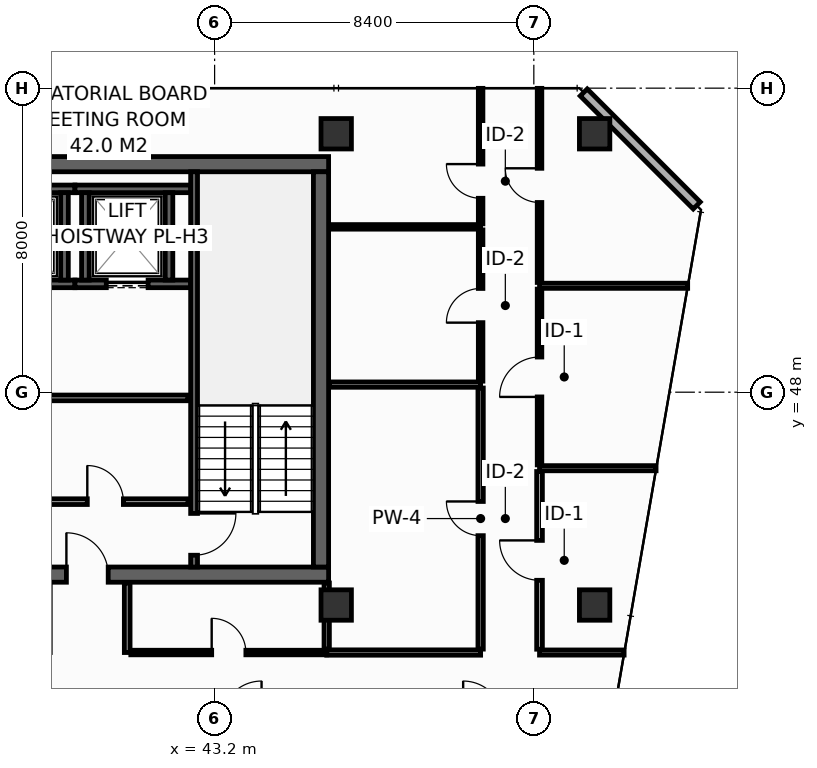
"""IFC4 building model, lengths in metres.
Left out: names, types, materials, properties, quantities, classifications, styles, units other than length and angle.
Written with IfcOpenShell. Run it as: python <this file> out.ifc"""

import sys

from ifc_helpers import new_model, si_unit, direction, frame, frame_2d, origin, origin_2d, place, context, subcontext, project, spatial, rectangle, hollow_rectangle, extrude, element, fill, save


model = new_model("IFC4")
c1 = context("Model", 3, precision=1e-05, world=origin(), true_north=direction((0.0, 1.0)))
c2 = subcontext(c1, "Body", "Model", "MODEL_VIEW")
j1 = project(units=[si_unit("LENGTHUNIT", "METRE"), si_unit("PLANEANGLEUNIT", "RADIAN")], contexts=[c1])
p1 = place(None, origin())
s1 = spatial("IfcSite", under=j1, at=p1, CompositionType="ELEMENT")
p2 = place(p1, origin())
s2 = spatial("IfcBuilding", under=s1, at=p2, CompositionType="ELEMENT")
p3 = place(p2, frame((0.0, 0.0, 249.6)))
s3 = spatial("IfcBuildingStorey", under=s2, at=p3, CompositionType="ELEMENT", Elevation=249.6)
p4 = place(p3, frame((13.7, 43.2, 0.0), z_axis=(0.0, 0.0, 1.0), x_axis=(1.0, 0.0, 0.0)))
e1 = element("IfcWall", 1, at=p4, inside=s3, PredefinedType="SHEAR", context=c2, shape_type="SweptSolid", body=[
    extrude(rectangle(XDim=32.5, YDim=0.4, at=frame_2d((16.25, 0.0))), origin(), (0.0, 0.0, 1.0), 3.35),
])
p5 = place(p4, frame((5.4, 0.0, 0.0)))
e2 = element("IfcOpeningElement", 2, at=p5, cuts=e1, PredefinedType="OPENING", context=c2, shape_type="SweptSolid", body=[
    extrude(rectangle(XDim=1.1, YDim=2.15, at=frame_2d((0.55, 1.075))), frame((0.0, 0.21, 0.0), z_axis=(0.0, -1.0, 0.0), x_axis=(1.0, 0.0, 0.0)), (0.0, 0.0, 1.0), 0.42),
])
p6 = place(p4, frame((25.6, 0.0, 0.0)))
e3 = element("IfcOpeningElement", 3, at=p6, cuts=e1, PredefinedType="OPENING", context=c2, shape_type="SweptSolid", body=[
    extrude(rectangle(XDim=1.1, YDim=2.15, at=frame_2d((0.55, 1.075))), frame((0.0, 0.21, 0.0), z_axis=(0.0, -1.0, 0.0), x_axis=(1.0, 0.0, 0.0)), (0.0, 0.0, 1.0), 0.42),
])
p7 = place(p3, frame((13.7, 54.0, 0.0), z_axis=(0.0, 0.0, 1.0), x_axis=(1.0, 0.0, 0.0)))
e4 = element("IfcWall", 4, at=p7, inside=s3, PredefinedType="SHEAR", context=c2, shape_type="SweptSolid", body=[
    extrude(rectangle(XDim=32.5, YDim=0.4, at=frame_2d((16.25, 0.0))), origin(), (0.0, 0.0, 1.0), 3.35),
])
p8 = place(p3, frame((46.0, 43.4, 0.0), z_axis=(0.0, 0.0, 1.0), x_axis=(0.0, 1.0, 0.0)))
e5 = element("IfcWall", 5, at=p8, inside=s3, PredefinedType="SHEAR", context=c2, shape_type="SweptSolid", body=[
    extrude(rectangle(XDim=10.4, YDim=0.4, at=frame_2d((5.2, 0.0))), origin(), (0.0, 0.0, 1.0), 3.35),
])
for number, where, z_axis, x_axis in (
    (6, (46.4, 54.8, 0.0), (0.0, 0.0, 1.0), (1.0, 0.0, 0.0)),
    (7, (53.2, 54.8, 0.0), (0.0, 0.0, 1.0), (1.0, 0.0, 0.0)),
    (8, (46.4, 42.4, 0.0), (0.0, 0.0, 1.0), (1.0, 0.0, 0.0)),
    (9, (53.2, 42.4, 0.0), (0.0, 0.0, 1.0), (1.0, 0.0, 0.0)),
):
    element("IfcColumn", number, at=place(p3, frame(where, z_axis=z_axis, x_axis=x_axis)), inside=s3, PredefinedType="COLUMN", context=c2, shape_type="SweptSolid", body=[
        extrude(hollow_rectangle(XDim=0.8, YDim=0.8, WallThickness=0.036, at=origin_2d()), origin(), (0.0, 0.0, 1.0), 3.8),
    ])
p9 = place(p3, frame((36.775, 50.85, 0.0), z_axis=(0.0, 0.0, 1.0), x_axis=(1.0, 0.0, 0.0)))
e10 = element("IfcWall", 10, at=p9, inside=s3, PredefinedType="SHEAR", context=c2, shape_type="SweptSolid", body=[
    extrude(rectangle(XDim=2.75, YDim=0.2, at=frame_2d((1.375, 0.0))), origin(), (0.0, 0.0, 1.0), 3.35),
])
p10 = place(p9, frame((0.825, 0.0, 0.0)))
e11 = element("IfcOpeningElement", 11, at=p10, cuts=e10, PredefinedType="OPENING", context=c2, shape_type="SweptSolid", body=[
    extrude(rectangle(XDim=1.1, YDim=2.2, at=frame_2d((0.55, 1.1))), frame((0.0, 0.11, 0.0), z_axis=(0.0, -1.0, 0.0), x_axis=(1.0, 0.0, 0.0)), (0.0, 0.0, 1.0), 0.22),
])
p11 = place(p3, frame((36.775, 53.35, 0.0), z_axis=(0.0, 0.0, 1.0), x_axis=(1.0, 0.0, 0.0)))
e12 = element("IfcWall", 12, at=p11, inside=s3, PredefinedType="SHEAR", context=c2, shape_type="SweptSolid", body=[
    extrude(rectangle(XDim=2.75, YDim=0.2, at=frame_2d((1.375, 0.0))), origin(), (0.0, 0.0, 1.0), 3.35),
])
p12 = place(p3, frame((39.25, 50.95, 0.0), z_axis=(0.0, 0.0, 1.0), x_axis=(0.0, 1.0, 0.0)))
e13 = element("IfcWall", 13, at=p12, inside=s3, PredefinedType="SHEAR", context=c2, shape_type="SweptSolid", body=[
    extrude(rectangle(XDim=2.3, YDim=0.2, at=frame_2d((1.15, 0.0))), origin(), (0.0, 0.0, 1.0), 3.35),
])
p13 = place(p3, frame((39.525, 50.85, 0.0), z_axis=(0.0, 0.0, 1.0), x_axis=(1.0, 0.0, 0.0)))
e14 = element("IfcWall", 14, at=p13, inside=s3, PredefinedType="SHEAR", context=c2, shape_type="SweptSolid", body=[
    extrude(rectangle(XDim=3.045, YDim=0.2, at=frame_2d((1.522, 0.0))), origin(), (0.0, 0.0, 1.0), 3.35),
])
p14 = place(p13, frame((0.825, 0.0, 0.0)))
e15 = element("IfcOpeningElement", 15, at=p14, cuts=e14, PredefinedType="OPENING", context=c2, shape_type="SweptSolid", body=[
    extrude(rectangle(XDim=1.1, YDim=2.2, at=frame_2d((0.55, 1.1))), frame((0.0, 0.11, 0.0), z_axis=(0.0, -1.0, 0.0), x_axis=(1.0, 0.0, 0.0)), (0.0, 0.0, 1.0), 0.22),
])
p15 = place(p3, frame((39.525, 53.35, 0.0), z_axis=(0.0, 0.0, 1.0), x_axis=(1.0, 0.0, 0.0)))
e16 = element("IfcWall", 16, at=p15, inside=s3, PredefinedType="SHEAR", context=c2, shape_type="SweptSolid", body=[
    extrude(rectangle(XDim=3.045, YDim=0.2, at=frame_2d((1.522, 0.0))), origin(), (0.0, 0.0, 1.0), 3.35),
])
for number, where, z_axis, x_axis in (
    (17, (39.8, 50.95, 0.0), (0.0, 0.0, 1.0), (0.0, 1.0, 0.0)),
    (18, (42.0, 50.95, 0.0), (0.0, 0.0, 1.0), (0.0, 1.0, 0.0)),
):
    element("IfcWall", number, at=place(p3, frame(where, z_axis=z_axis, x_axis=x_axis)), inside=s3, PredefinedType="SHEAR", context=c2, shape_type="SweptSolid", body=[
        extrude(rectangle(XDim=2.3, YDim=0.2, at=frame_2d((1.15, 0.0))), origin(), (0.0, 0.0, 1.0), 3.35),
    ])
p16 = place(p3, frame((42.66, 53.8, 0.0), z_axis=(0.0, 0.0, 1.0), x_axis=(0.0, -1.0, 0.0)))
e19 = element("IfcWall", 19, at=p16, inside=s3, PredefinedType="SHEAR", context=c2, shape_type="SweptSolid", body=[
    extrude(rectangle(XDim=10.4, YDim=0.18, at=frame_2d((5.2, 0.0))), origin(), (0.0, 0.0, 1.0), 3.35),
])
p17 = place(p16, frame((8.99, 0.0, 0.0)))
e20 = element("IfcOpeningElement", 20, at=p17, cuts=e19, PredefinedType="OPENING", context=c2, shape_type="SweptSolid", body=[
    extrude(rectangle(XDim=1.1, YDim=2.15, at=frame_2d((0.55, 1.075))), frame((0.0, 0.1, 0.0), z_axis=(0.0, -1.0, 0.0), x_axis=(1.0, 0.0, 0.0)), (0.0, 0.0, 1.0), 0.2),
])
p18 = place(p3, frame((34.05, 45.12, 0.0), z_axis=(0.0, 0.0, 1.0), x_axis=(1.0, 0.0, 0.0)))
e21 = element("IfcWall", 21, at=p18, inside=s3, PredefinedType="PARTITIONING", context=c2, shape_type="SweptSolid", body=[
    extrude(rectangle(XDim=8.45, YDim=0.15, at=frame_2d((4.225, 0.0))), origin(), (0.0, 0.0, 1.0), 3.35),
])
p19 = place(p18, frame((1.5, 0.0, 0.0)))
e22 = element("IfcOpeningElement", 22, at=p19, cuts=e21, PredefinedType="OPENING", context=c2, shape_type="SweptSolid", body=[
    extrude(rectangle(XDim=0.95, YDim=2.15, at=frame_2d((0.475, 1.075))), frame((0.0, 0.085, 0.0), z_axis=(0.0, -1.0, 0.0), x_axis=(1.0, 0.0, 0.0)), (0.0, 0.0, 1.0), 0.17),
])
p20 = place(p18, frame((5.8, 0.0, 0.0)))
e23 = element("IfcOpeningElement", 23, at=p20, cuts=e21, PredefinedType="OPENING", context=c2, shape_type="SweptSolid", body=[
    extrude(rectangle(XDim=0.95, YDim=2.15, at=frame_2d((0.475, 1.075))), frame((0.0, 0.085, 0.0), z_axis=(0.0, -1.0, 0.0), x_axis=(1.0, 0.0, 0.0)), (0.0, 0.0, 1.0), 0.17),
])
p21 = place(p3, frame((34.05, 47.85, 0.0), z_axis=(0.0, 0.0, 1.0), x_axis=(1.0, 0.0, 0.0)))
e24 = element("IfcWall", 24, at=p21, inside=s3, PredefinedType="PARTITIONING", context=c2, shape_type="SweptSolid", body=[
    extrude(rectangle(XDim=8.45, YDim=0.15, at=frame_2d((4.225, 0.0))), origin(), (0.0, 0.0, 1.0), 3.35),
])
p22 = place(p3, frame((55.887, 52.913, 0.0), z_axis=(0.0, 0.0, 1.0), x_axis=(-0.707106781187, 0.707106781187, 0.0)))
e25 = element("IfcWall", 25, at=p22, inside=s3, PredefinedType="STANDARD", context=c2, shape_type="SweptSolid", body=[
    extrude(rectangle(XDim=4.206, YDim=0.26, at=frame_2d((2.103, 0.0))), origin(), (0.0, 0.0, 1.0), 3.35),
])
p23 = place(p3, frame((46.15, 41.15, 0.0), z_axis=(0.0, 0.0, 1.0), x_axis=(1.0, 0.0, 0.0)))
e26 = element("IfcWall", 26, at=p23, inside=s3, PredefinedType="PARTITIONING", context=c2, shape_type="SweptSolid", body=[
    extrude(rectangle(XDim=4.05, YDim=0.14, at=frame_2d((2.025, 0.0))), origin(), (0.0, 0.0, 1.0), 3.35),
])
p24 = place(p3, frame((46.15, 41.24, 0.0), z_axis=(0.0, 0.0, 1.0), x_axis=(0.0, 1.0, 0.0)))
e27 = element("IfcWall", 27, at=p24, inside=s3, PredefinedType="PARTITIONING", context=c2, shape_type="SweptSolid", body=[
    extrude(rectangle(XDim=1.74, YDim=0.14, at=frame_2d((0.87, 0.0))), origin(), (0.0, 0.0, 1.0), 3.35),
])
p25 = place(p3, frame((46.22, 48.2, 0.0), z_axis=(0.0, 0.0, 1.0), x_axis=(1.0, 0.0, 0.0)))
e28 = element("IfcWall", 28, at=p25, inside=s3, PredefinedType="PARTITIONING", context=c2, shape_type="SweptSolid", body=[
    extrude(rectangle(XDim=3.98, YDim=0.14, at=frame_2d((1.99, 0.0))), origin(), (0.0, 0.0, 1.0), 3.35),
])
p26 = place(p3, frame((50.2, 41.24, 0.0), z_axis=(0.0, 0.0, 1.0), x_axis=(0.0, 1.0, 0.0)))
e29 = element("IfcWall", 29, at=p26, inside=s3, PredefinedType="PARTITIONING", context=c2, shape_type="SweptSolid", body=[
    extrude(rectangle(XDim=6.87, YDim=0.14, at=frame_2d((3.435, 0.0))), origin(), (0.0, 0.0, 1.0), 2.747),
])
p27 = place(p26, frame((2.985, 0.0, 0.0)))
e30 = element("IfcOpeningElement", 30, at=p27, cuts=e29, PredefinedType="OPENING", context=c2, shape_type="SweptSolid", body=[
    extrude(rectangle(XDim=0.9, YDim=2.1, at=frame_2d((0.45, 1.05))), frame((0.0, 0.08, 0.0), z_axis=(0.0, -1.0, 0.0), x_axis=(1.0, 0.0, 0.0)), (0.0, 0.0, 1.0), 0.16),
])
p28 = place(p3, frame((46.22, 52.35, 0.0), z_axis=(0.0, 0.0, 1.0), x_axis=(1.0, 0.0, 0.0)))
e31 = element("IfcWall", 31, at=p28, inside=s3, PredefinedType="PARTITIONING", context=c2, shape_type="SweptSolid", body=[
    extrude(rectangle(XDim=3.98, YDim=0.12, at=frame_2d((1.99, 0.0))), origin(), (0.0, 0.0, 1.0), 3.35),
])
p29 = place(p3, frame((50.2, 48.29, 0.0), z_axis=(0.0, 0.0, 1.0), x_axis=(0.0, 1.0, 0.0)))
e32 = element("IfcWall", 32, at=p29, inside=s3, PredefinedType="PARTITIONING", context=c2, shape_type="SweptSolid", body=[
    extrude(rectangle(XDim=3.98, YDim=0.12, at=frame_2d((1.99, 0.0))), origin(), (0.0, 0.0, 1.0), 3.35),
])
p30 = place(p29, frame((1.54, 0.0, 0.0)))
e33 = element("IfcOpeningElement", 33, at=p30, cuts=e32, PredefinedType="OPENING", context=c2, shape_type="SweptSolid", body=[
    extrude(rectangle(XDim=0.9, YDim=2.1, at=frame_2d((0.45, 1.05))), frame((0.0, 0.07, 0.0), z_axis=(0.0, -1.0, 0.0), x_axis=(1.0, 0.0, 0.0)), (0.0, 0.0, 1.0), 0.14),
])
p31 = place(p3, frame((50.2, 52.43, 0.0), z_axis=(0.0, 0.0, 1.0), x_axis=(0.0, 1.0, 0.0)))
e34 = element("IfcWall", 34, at=p31, inside=s3, PredefinedType="PARTITIONING", context=c2, shape_type="SweptSolid", body=[
    extrude(rectangle(XDim=3.565, YDim=0.12, at=frame_2d((1.783, 0.0))), origin(), (0.0, 0.0, 1.0), 2.735),
])
p32 = place(p31, frame((0.672, 0.0, 0.0)))
e35 = element("IfcOpeningElement", 35, at=p32, cuts=e34, PredefinedType="OPENING", context=c2, shape_type="SweptSolid", body=[
    extrude(rectangle(XDim=0.9, YDim=2.1, at=frame_2d((0.45, 1.05))), frame((0.0, 0.07, 0.0), z_axis=(0.0, -1.0, 0.0), x_axis=(1.0, 0.0, 0.0)), (0.0, 0.0, 1.0), 0.14),
])
p33 = place(p3, frame((51.75, 41.15, 0.0), z_axis=(0.0, 0.0, 1.0), x_axis=(1.0, 0.0, 0.0)))
e36 = element("IfcWall", 36, at=p33, inside=s3, PredefinedType="PARTITIONING", context=c2, shape_type="SweptSolid", body=[
    extrude(rectangle(XDim=2.226, YDim=0.135, at=frame_2d((1.113, 0.0))), origin(), (0.0, 0.0, 1.0), 2.885),
])
p34 = place(p3, frame((51.75, 46.0, 0.0), z_axis=(0.0, 0.0, 1.0), x_axis=(1.0, 0.0, 0.0)))
e37 = element("IfcWall", 37, at=p34, inside=s3, PredefinedType="PARTITIONING", context=c2, shape_type="SweptSolid", body=[
    extrude(rectangle(XDim=3.066, YDim=0.135, at=frame_2d((1.533, 0.0))), origin(), (0.0, 0.0, 1.0), 2.747),
])
p35 = place(p3, frame((51.75, 50.8, 0.0), z_axis=(0.0, 0.0, 1.0), x_axis=(1.0, 0.0, 0.0)))
e38 = element("IfcWall", 38, at=p35, inside=s3, PredefinedType="PARTITIONING", context=c2, shape_type="SweptSolid", body=[
    extrude(rectangle(XDim=3.898, YDim=0.135, at=frame_2d((1.949, 0.0))), origin(), (0.0, 0.0, 1.0), 2.747),
])
p36 = place(p3, frame((51.75, 41.238, 0.0), z_axis=(0.0, 0.0, 1.0), x_axis=(0.0, 1.0, 0.0)))
e39 = element("IfcWall", 39, at=p36, inside=s3, PredefinedType="PARTITIONING", context=c2, shape_type="SweptSolid", body=[
    extrude(rectangle(XDim=4.675, YDim=0.15, at=frame_2d((2.337, 0.0))), origin(), (0.0, 0.0, 1.0), 2.747),
])
p37 = place(p36, frame((1.813, 0.0, 0.0)))
e40 = element("IfcOpeningElement", 40, at=p37, cuts=e39, PredefinedType="OPENING", context=c2, shape_type="SweptSolid", body=[
    extrude(rectangle(XDim=1.05, YDim=2.15, at=frame_2d((0.525, 1.075))), frame((0.0, 0.085, 0.0), z_axis=(0.0, -1.0, 0.0), x_axis=(1.0, 0.0, 0.0)), (0.0, 0.0, 1.0), 0.17),
])
p38 = place(p3, frame((51.75, 46.087, 0.0), z_axis=(0.0, 0.0, 1.0), x_axis=(0.0, 1.0, 0.0)))
e41 = element("IfcWall", 41, at=p38, inside=s3, PredefinedType="PARTITIONING", context=c2, shape_type="SweptSolid", body=[
    extrude(rectangle(XDim=4.625, YDim=0.12, at=frame_2d((2.312, 0.0))), origin(), (0.0, 0.0, 1.0), 3.35),
])
p39 = place(p38, frame((1.788, 0.0, 0.0)))
e42 = element("IfcOpeningElement", 42, at=p39, cuts=e41, PredefinedType="OPENING", context=c2, shape_type="SweptSolid", body=[
    extrude(rectangle(XDim=1.05, YDim=2.15, at=frame_2d((0.525, 1.075))), frame((0.0, 0.07, 0.0), z_axis=(0.0, -1.0, 0.0), x_axis=(1.0, 0.0, 0.0)), (0.0, 0.0, 1.0), 0.14),
])
p40 = place(p3, frame((51.75, 50.887, 0.0), z_axis=(0.0, 0.0, 1.0), x_axis=(0.0, 1.0, 0.0)))
e43 = element("IfcWall", 43, at=p40, inside=s3, PredefinedType="PARTITIONING", context=c2, shape_type="SweptSolid", body=[
    extrude(rectangle(XDim=5.108, YDim=0.12, at=frame_2d((2.554, 0.0))), origin(), (0.0, 0.0, 1.0), 2.735),
])
p41 = place(p40, frame((2.104, 0.0, 0.0)))
e44 = element("IfcOpeningElement", 44, at=p41, cuts=e43, PredefinedType="OPENING", context=c2, shape_type="SweptSolid", body=[
    extrude(rectangle(XDim=0.9, YDim=2.1, at=frame_2d((0.45, 1.05))), frame((0.0, 0.07, 0.0), z_axis=(0.0, -1.0, 0.0), x_axis=(1.0, 0.0, 0.0)), (0.0, 0.0, 1.0), 0.14),
])
p42 = place(p3, frame((40.9, 41.15, 0.0), z_axis=(0.0, 0.0, 1.0), x_axis=(0.0, 1.0, 0.0)))
e45 = element("IfcWall", 45, at=p42, inside=s3, PredefinedType="PARTITIONING", context=c2, shape_type="SweptSolid", body=[
    extrude(rectangle(XDim=1.83, YDim=0.15, at=frame_2d((0.915, 0.0))), origin(), (0.0, 0.0, 1.0), 3.35),
])
p43 = place(p3, frame((40.995, 41.15, 0.0), z_axis=(0.0, 0.0, 1.0), x_axis=(1.0, 0.0, 0.0)))
e46 = element("IfcWall", 46, at=p43, inside=s3, PredefinedType="PARTITIONING", context=c2, shape_type="SweptSolid", body=[
    extrude(rectangle(XDim=5.155, YDim=0.12, at=frame_2d((2.577, 0.0))), origin(), (0.0, 0.0, 1.0), 3.35),
])
p44 = place(p43, frame((2.128, 0.0, 0.0)))
e47 = element("IfcOpeningElement", 47, at=p44, cuts=e46, PredefinedType="OPENING", context=c2, shape_type="SweptSolid", body=[
    extrude(rectangle(XDim=0.9, YDim=2.1, at=frame_2d((0.45, 1.05))), frame((0.0, 0.07, 0.0), z_axis=(0.0, -1.0, 0.0), x_axis=(1.0, 0.0, 0.0)), (0.0, 0.0, 1.0), 0.14),
])
p45 = place(p14, origin())
e48 = element("IfcDoor", 48, at=p45, inside=s3, OperationType="SLIDING_TO_LEFT", PredefinedType="DOOR", context=c2, shape_type="SweptSolid", body=[
    extrude(rectangle(XDim=1.1, YDim=2.2, at=frame_2d((0.55, 1.1))), frame((0.0, 0.025, 0.0), z_axis=(0.0, -1.0, 0.0), x_axis=(1.0, 0.0, 0.0)), (0.0, 0.0, 1.0), 0.05),
])
fill(e15, e48)
p46 = place(p17, origin())
e49 = element("IfcDoor", 49, at=p46, inside=s3, OperationType="SINGLE_SWING_LEFT", PredefinedType="DOOR", context=c2, shape_type="SweptSolid", body=[
    extrude(rectangle(XDim=1.1, YDim=2.15, at=frame_2d((0.55, 1.075))), frame((0.0, 0.025, 0.0), z_axis=(0.0, -1.0, 0.0), x_axis=(1.0, 0.0, 0.0)), (0.0, 0.0, 1.0), 0.05),
])
fill(e20, e49)
p47 = place(p6, origin())
e50 = element("IfcDoor", 50, at=p47, inside=s3, OperationType="SINGLE_SWING_LEFT", PredefinedType="DOOR", context=c2, shape_type="SweptSolid", body=[
    extrude(rectangle(XDim=1.1, YDim=2.15, at=frame_2d((0.55, 1.075))), frame((0.0, 0.025, 0.0), z_axis=(0.0, -1.0, 0.0), x_axis=(1.0, 0.0, 0.0)), (0.0, 0.0, 1.0), 0.05),
])
fill(e3, e50)
p48 = place(p20, origin())
e51 = element("IfcDoor", 51, at=p48, inside=s3, OperationType="SINGLE_SWING_LEFT", PredefinedType="DOOR", context=c2, shape_type="SweptSolid", body=[
    extrude(rectangle(XDim=0.95, YDim=2.15, at=frame_2d((0.475, 1.075))), frame((0.0, 0.025, 0.0), z_axis=(0.0, -1.0, 0.0), x_axis=(1.0, 0.0, 0.0)), (0.0, 0.0, 1.0), 0.05),
])
fill(e23, e51)
p49 = place(p27, origin())
e52 = element("IfcDoor", 52, at=p49, inside=s3, OperationType="SINGLE_SWING_RIGHT", PredefinedType="DOOR", context=c2, shape_type="SweptSolid", body=[
    extrude(rectangle(XDim=0.9, YDim=2.1, at=frame_2d((0.45, 1.05))), frame((0.0, 0.025, 0.0), z_axis=(0.0, -1.0, 0.0), x_axis=(1.0, 0.0, 0.0)), (0.0, 0.0, 1.0), 0.05),
])
fill(e30, e52)
p50 = place(p30, origin())
e53 = element("IfcDoor", 53, at=p50, inside=s3, OperationType="SINGLE_SWING_LEFT", PredefinedType="DOOR", context=c2, shape_type="SweptSolid", body=[
    extrude(rectangle(XDim=0.9, YDim=2.1, at=frame_2d((0.45, 1.05))), frame((0.0, 0.025, 0.0), z_axis=(0.0, -1.0, 0.0), x_axis=(1.0, 0.0, 0.0)), (0.0, 0.0, 1.0), 0.05),
])
fill(e33, e53)
p51 = place(p32, origin())
e54 = element("IfcDoor", 54, at=p51, inside=s3, OperationType="SINGLE_SWING_RIGHT", PredefinedType="DOOR", context=c2, shape_type="SweptSolid", body=[
    extrude(rectangle(XDim=0.9, YDim=2.1, at=frame_2d((0.45, 1.05))), frame((0.0, 0.025, 0.0), z_axis=(0.0, -1.0, 0.0), x_axis=(1.0, 0.0, 0.0)), (0.0, 0.0, 1.0), 0.05),
])
fill(e35, e54)
p52 = place(p37, origin())
e55 = element("IfcDoor", 55, at=p52, inside=s3, OperationType="SINGLE_SWING_RIGHT", PredefinedType="DOOR", context=c2, shape_type="SweptSolid", body=[
    extrude(rectangle(XDim=1.05, YDim=2.15, at=frame_2d((0.525, 1.075))), frame((0.0, 0.025, 0.0), z_axis=(0.0, -1.0, 0.0), x_axis=(1.0, 0.0, 0.0)), (0.0, 0.0, 1.0), 0.05),
])
fill(e40, e55)
p53 = place(p39, origin())
e56 = element("IfcDoor", 56, at=p53, inside=s3, OperationType="SINGLE_SWING_LEFT", PredefinedType="DOOR", context=c2, shape_type="SweptSolid", body=[
    extrude(rectangle(XDim=1.05, YDim=2.15, at=frame_2d((0.525, 1.075))), frame((0.0, 0.025, 0.0), z_axis=(0.0, -1.0, 0.0), x_axis=(1.0, 0.0, 0.0)), (0.0, 0.0, 1.0), 0.05),
])
fill(e42, e56)
p54 = place(p41, origin())
e57 = element("IfcDoor", 57, at=p54, inside=s3, OperationType="SINGLE_SWING_RIGHT", PredefinedType="DOOR", context=c2, shape_type="SweptSolid", body=[
    extrude(rectangle(XDim=0.9, YDim=2.1, at=frame_2d((0.45, 1.05))), frame((0.0, 0.025, 0.0), z_axis=(0.0, -1.0, 0.0), x_axis=(1.0, 0.0, 0.0)), (0.0, 0.0, 1.0), 0.05),
])
fill(e44, e57)
p55 = place(p44, origin())
e58 = element("IfcDoor", 58, at=p55, inside=s3, OperationType="SINGLE_SWING_LEFT", PredefinedType="DOOR", context=c2, shape_type="SweptSolid", body=[
    extrude(rectangle(XDim=0.9, YDim=2.1, at=frame_2d((0.45, 1.05))), frame((0.0, 0.025, 0.0), z_axis=(0.0, -1.0, 0.0), x_axis=(1.0, 0.0, 0.0)), (0.0, 0.0, 1.0), 0.05),
])
fill(e47, e58)
save(model, sys.argv[1])
